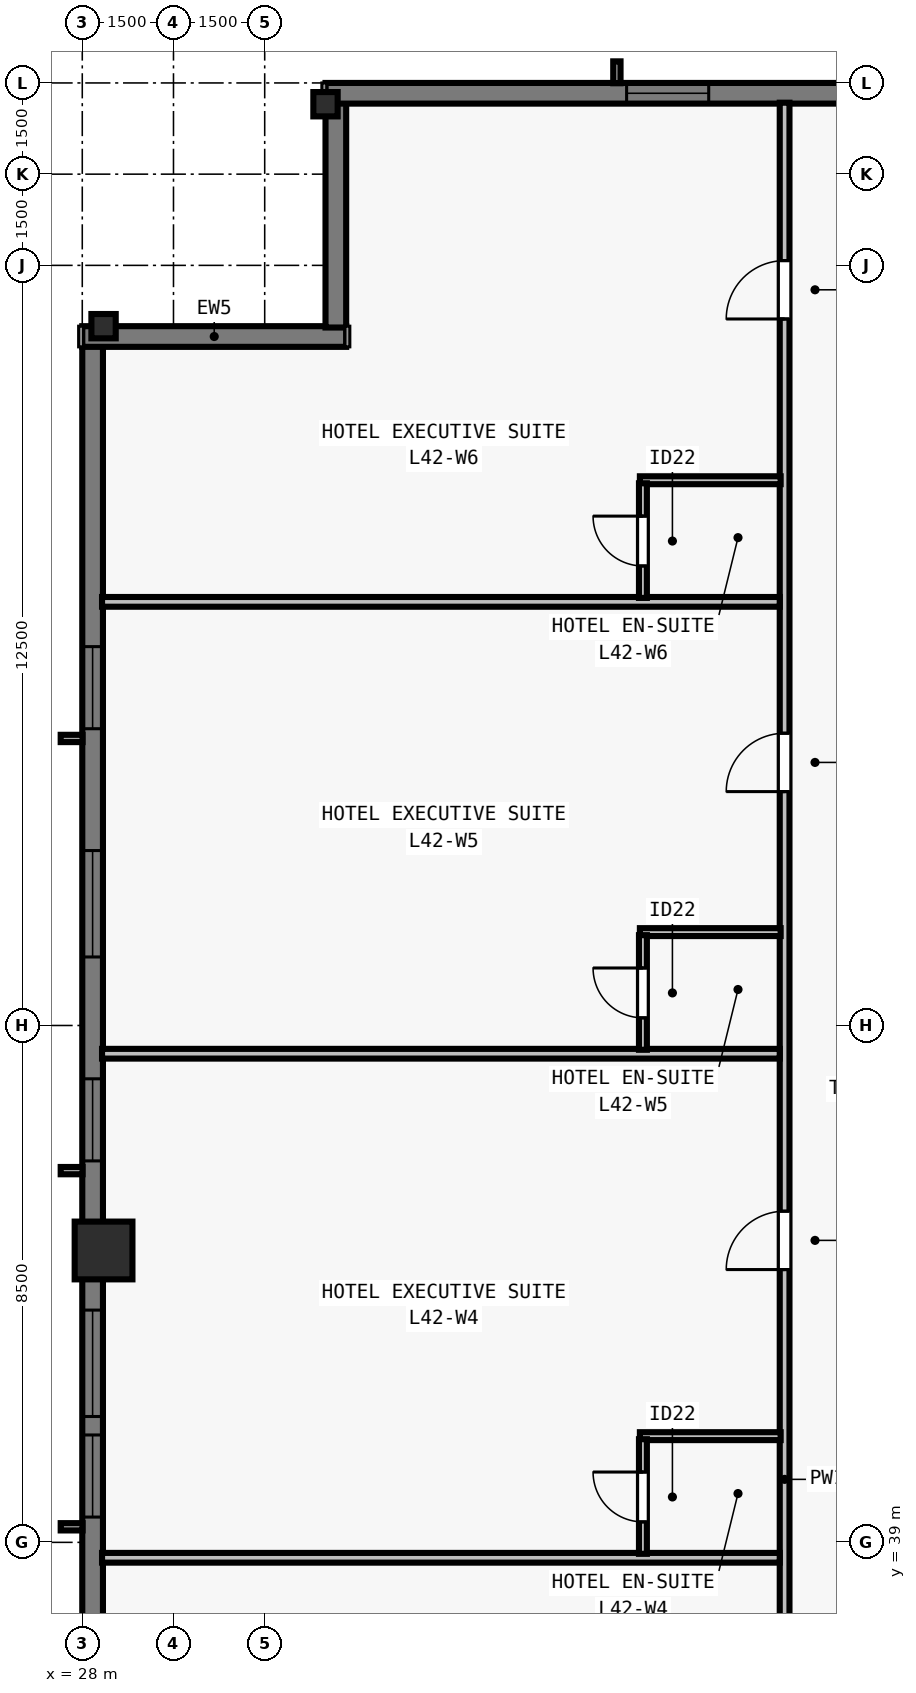
"""IFC4 building model, lengths in metres.
Left out: names, types, materials, properties, quantities, classifications, styles, units other than length and angle.
Written with IfcOpenShell. Run it as: python <this file> out.ifc"""

import sys

from ifc_helpers import new_model, si_unit, direction, frame, frame_2d, origin, origin_2d, place, context, subcontext, project, spatial, rectangle, i_section, extrude, element, fill, save


model = new_model("IFC4")
c1 = context("Model", 3, precision=1e-05, world=origin(), true_north=direction((0.0, 1.0)))
c2 = subcontext(c1, "Body", "Model", "MODEL_VIEW")
j1 = project(units=[si_unit("LENGTHUNIT", "METRE"), si_unit("PLANEANGLEUNIT", "RADIAN")], contexts=[c1])
p1 = place(None, origin())
s1 = spatial("IfcSite", under=j1, at=p1, CompositionType="ELEMENT")
p2 = place(p1, origin())
s2 = spatial("IfcBuilding", under=s1, at=p2, CompositionType="ELEMENT")
p3 = place(p2, frame((0.0, 0.0, 155.0)))
s3 = spatial("IfcBuildingStorey", under=s2, at=p3, CompositionType="ELEMENT", Elevation=155.0)
for number, where, z_axis, x_axis in (
    (1, (32.0, 62.65, 0.0), (0.0, 0.0, 1.0), (1.0, 0.0, 0.0)),
    (2, (28.35, 59.0, 0.0), (0.0, 0.0, 1.0), (0.0, 1.0, 0.0)),
):
    element("IfcColumn", number, at=place(p3, frame(where, z_axis=z_axis, x_axis=x_axis)), inside=s3, PredefinedType="COLUMN", context=c2, shape_type="SweptSolid", body=[
        extrude(i_section(OverallWidth=0.4, OverallDepth=0.4, WebThickness=0.022, FlangeThickness=0.036, at=origin_2d()), origin(), (0.0, 0.0, 1.0), 3.5),
    ])
p4 = place(p3, frame((28.35, 43.8, 0.0), z_axis=(0.0, 0.0, 1.0), x_axis=(0.0, 1.0, 0.0)))
e3 = element("IfcColumn", 3, at=p4, inside=s3, PredefinedType="COLUMN", context=c2, shape_type="SweptSolid", body=[
    extrude(rectangle(XDim=0.95, YDim=0.95, at=origin_2d()), origin(), (0.0, 0.0, 1.0), 3.5),
])
p5 = place(p3, frame((28.17, 19.0, 0.0), z_axis=(0.0, 0.0, 1.0), x_axis=(0.0, 1.0, 0.0)))
e4 = element("IfcWall", 4, at=p5, inside=s3, PredefinedType="SOLIDWALL", context=c2, shape_type="SweptSolid", body=[
    extrude(rectangle(XDim=39.682, YDim=0.34, at=frame_2d((19.841, 0.0))), origin(), (0.0, 0.0, 1.0), 3.28),
])
p6 = place(p5, frame((4.952, 0.0, 0.8)))
e5 = element("IfcOpeningElement", 5, at=p6, cuts=e4, PredefinedType="OPENING", context=c2, shape_type="SweptSolid", body=[
    extrude(rectangle(XDim=1.35, YDim=1.66, at=frame_2d((0.675, 0.83))), frame((0.0, 0.18, 0.0), z_axis=(0.0, -1.0, 0.0), x_axis=(1.0, 0.0, 0.0)), (0.0, 0.0, 1.0), 0.36),
])
p7 = place(p5, frame((8.305, 0.0, 0.8)))
e6 = element("IfcOpeningElement", 6, at=p7, cuts=e4, PredefinedType="OPENING", context=c2, shape_type="SweptSolid", body=[
    extrude(rectangle(XDim=1.75, YDim=1.66, at=frame_2d((0.875, 0.83))), frame((0.0, 0.18, 0.0), z_axis=(0.0, -1.0, 0.0), x_axis=(1.0, 0.0, 0.0)), (0.0, 0.0, 1.0), 0.36),
])
p8 = place(p5, frame((12.909, 0.0, 0.8)))
e7 = element("IfcOpeningElement", 7, at=p8, cuts=e4, PredefinedType="OPENING", context=c2, shape_type="SweptSolid", body=[
    extrude(rectangle(XDim=1.35, YDim=1.66, at=frame_2d((0.675, 0.83))), frame((0.0, 0.18, 0.0), z_axis=(0.0, -1.0, 0.0), x_axis=(1.0, 0.0, 0.0)), (0.0, 0.0, 1.0), 0.36),
])
p9 = place(p5, frame((16.262, 0.0, 0.8)))
e8 = element("IfcOpeningElement", 8, at=p9, cuts=e4, PredefinedType="OPENING", context=c2, shape_type="SweptSolid", body=[
    extrude(rectangle(XDim=1.75, YDim=1.66, at=frame_2d((0.875, 0.83))), frame((0.0, 0.18, 0.0), z_axis=(0.0, -1.0, 0.0), x_axis=(1.0, 0.0, 0.0)), (0.0, 0.0, 1.0), 0.36),
])
p10 = place(p5, frame((20.416, 0.0, 0.8)))
e9 = element("IfcOpeningElement", 9, at=p10, cuts=e4, PredefinedType="OPENING", context=c2, shape_type="SweptSolid", body=[
    extrude(rectangle(XDim=1.35, YDim=1.66, at=frame_2d((0.675, 0.83))), frame((0.0, 0.18, 0.0), z_axis=(0.0, -1.0, 0.0), x_axis=(1.0, 0.0, 0.0)), (0.0, 0.0, 1.0), 0.36),
])
p11 = place(p5, frame((22.07, 0.0, 0.8)))
e10 = element("IfcOpeningElement", 10, at=p11, cuts=e4, PredefinedType="OPENING", context=c2, shape_type="SweptSolid", body=[
    extrude(rectangle(XDim=1.75, YDim=1.66, at=frame_2d((0.875, 0.83))), frame((0.0, 0.18, 0.0), z_axis=(0.0, -1.0, 0.0), x_axis=(1.0, 0.0, 0.0)), (0.0, 0.0, 1.0), 0.36),
])
p12 = place(p5, frame((26.273, 0.0, 0.8)))
e11 = element("IfcOpeningElement", 11, at=p12, cuts=e4, PredefinedType="OPENING", context=c2, shape_type="SweptSolid", body=[
    extrude(rectangle(XDim=1.35, YDim=1.66, at=frame_2d((0.675, 0.83))), frame((0.0, 0.18, 0.0), z_axis=(0.0, -1.0, 0.0), x_axis=(1.0, 0.0, 0.0)), (0.0, 0.0, 1.0), 0.36),
])
p13 = place(p5, frame((29.627, 0.0, 0.8)))
e12 = element("IfcOpeningElement", 12, at=p13, cuts=e4, PredefinedType="OPENING", context=c2, shape_type="SweptSolid", body=[
    extrude(rectangle(XDim=1.75, YDim=1.66, at=frame_2d((0.875, 0.83))), frame((0.0, 0.18, 0.0), z_axis=(0.0, -1.0, 0.0), x_axis=(1.0, 0.0, 0.0)), (0.0, 0.0, 1.0), 0.36),
])
p14 = place(p5, frame((33.38, 0.0, 0.8)))
e13 = element("IfcOpeningElement", 13, at=p14, cuts=e4, PredefinedType="OPENING", context=c2, shape_type="SweptSolid", body=[
    extrude(rectangle(XDim=1.35, YDim=1.66, at=frame_2d((0.675, 0.83))), frame((0.0, 0.18, 0.0), z_axis=(0.0, -1.0, 0.0), x_axis=(1.0, 0.0, 0.0)), (0.0, 0.0, 1.0), 0.36),
])
p15 = place(p3, frame((28.0, 58.83, 0.0), z_axis=(0.0, 0.0, 1.0), x_axis=(1.0, 0.0, 0.0)))
e14 = element("IfcWall", 14, at=p15, inside=s3, PredefinedType="SOLIDWALL", context=c2, shape_type="SweptSolid", body=[
    extrude(rectangle(XDim=4.34, YDim=0.34, at=frame_2d((2.17, 0.0))), origin(), (0.0, 0.0, 1.0), 3.28),
])
p16 = place(p3, frame((32.17, 58.978, 0.0), z_axis=(0.0, 0.0, 1.0), x_axis=(0.0, 1.0, 0.0)))
e15 = element("IfcWall", 15, at=p16, inside=s3, PredefinedType="SOLIDWALL", context=c2, shape_type="SweptSolid", body=[
    extrude(rectangle(XDim=3.704, YDim=0.34, at=frame_2d((1.852, 0.0))), origin(), (0.0, 0.0, 1.0), 3.28),
])
p17 = place(p3, frame((32.0, 62.83, 0.0), z_axis=(0.0, 0.0, 1.0), x_axis=(1.0, 0.0, 0.0)))
e16 = element("IfcWall", 16, at=p17, inside=s3, PredefinedType="SOLIDWALL", context=c2, shape_type="SweptSolid", body=[
    extrude(rectangle(XDim=39.682, YDim=0.34, at=frame_2d((19.841, 0.0))), origin(), (0.0, 0.0, 1.0), 3.28),
])
p18 = place(p17, frame((4.952, 0.0, 0.8)))
e17 = element("IfcOpeningElement", 17, at=p18, cuts=e16, PredefinedType="OPENING", context=c2, shape_type="SweptSolid", body=[
    extrude(rectangle(XDim=1.35, YDim=1.66, at=frame_2d((0.675, 0.83))), frame((0.0, 0.18, 0.0), z_axis=(0.0, -1.0, 0.0), x_axis=(1.0, 0.0, 0.0)), (0.0, 0.0, 1.0), 0.36),
])
p19 = place(p17, frame((12.059, 0.0, 0.8)))
e18 = element("IfcOpeningElement", 18, at=p19, cuts=e16, PredefinedType="OPENING", context=c2, shape_type="SweptSolid", body=[
    extrude(rectangle(XDim=1.35, YDim=1.66, at=frame_2d((0.675, 0.83))), frame((0.0, 0.18, 0.0), z_axis=(0.0, -1.0, 0.0), x_axis=(1.0, 0.0, 0.0)), (0.0, 0.0, 1.0), 0.36),
])
p20 = place(p17, frame((16.262, 0.0, 0.8)))
e19 = element("IfcOpeningElement", 19, at=p20, cuts=e16, PredefinedType="OPENING", context=c2, shape_type="SweptSolid", body=[
    extrude(rectangle(XDim=1.75, YDim=1.66, at=frame_2d((0.875, 0.83))), frame((0.0, 0.18, 0.0), z_axis=(0.0, -1.0, 0.0), x_axis=(1.0, 0.0, 0.0)), (0.0, 0.0, 1.0), 0.36),
])
p21 = place(p17, frame((18.316, 0.0, 0.8)))
e20 = element("IfcOpeningElement", 20, at=p21, cuts=e16, PredefinedType="OPENING", context=c2, shape_type="SweptSolid", body=[
    extrude(rectangle(XDim=1.35, YDim=1.66, at=frame_2d((0.675, 0.83))), frame((0.0, 0.18, 0.0), z_axis=(0.0, -1.0, 0.0), x_axis=(1.0, 0.0, 0.0)), (0.0, 0.0, 1.0), 0.36),
])
p22 = place(p17, frame((22.07, 0.0, 0.8)))
e21 = element("IfcOpeningElement", 21, at=p22, cuts=e16, PredefinedType="OPENING", context=c2, shape_type="SweptSolid", body=[
    extrude(rectangle(XDim=1.75, YDim=1.66, at=frame_2d((0.875, 0.83))), frame((0.0, 0.18, 0.0), z_axis=(0.0, -1.0, 0.0), x_axis=(1.0, 0.0, 0.0)), (0.0, 0.0, 1.0), 0.36),
])
p23 = place(p17, frame((26.273, 0.0, 0.8)))
e22 = element("IfcOpeningElement", 22, at=p23, cuts=e16, PredefinedType="OPENING", context=c2, shape_type="SweptSolid", body=[
    extrude(rectangle(XDim=1.35, YDim=1.66, at=frame_2d((0.675, 0.83))), frame((0.0, 0.18, 0.0), z_axis=(0.0, -1.0, 0.0), x_axis=(1.0, 0.0, 0.0)), (0.0, 0.0, 1.0), 0.36),
])
p24 = place(p17, frame((29.627, 0.0, 0.8)))
e23 = element("IfcOpeningElement", 23, at=p24, cuts=e16, PredefinedType="OPENING", context=c2, shape_type="SweptSolid", body=[
    extrude(rectangle(XDim=1.75, YDim=1.66, at=frame_2d((0.875, 0.83))), frame((0.0, 0.18, 0.0), z_axis=(0.0, -1.0, 0.0), x_axis=(1.0, 0.0, 0.0)), (0.0, 0.0, 1.0), 0.36),
])
p25 = place(p3, frame((39.55, 15.325, 0.0), z_axis=(0.0, 0.0, 1.0), x_axis=(0.0, 1.0, 0.0)))
e24 = element("IfcWall", 24, at=p25, inside=s3, PredefinedType="PARTITIONING", context=c2, shape_type="SweptSolid", body=[
    extrude(rectangle(XDim=47.35, YDim=0.16, at=frame_2d((23.675, 0.0))), origin(), (0.0, 0.0, 1.0), 2.555),
])
p26 = place(p25, frame((4.718, 0.0, 0.0)))
e25 = element("IfcOpeningElement", 25, at=p26, cuts=e24, PredefinedType="OPENING", context=c2, shape_type="SweptSolid", body=[
    extrude(rectangle(XDim=0.96, YDim=2.15, at=frame_2d((0.48, 1.075))), frame((0.0, 0.09, 0.0), z_axis=(0.0, -1.0, 0.0), x_axis=(1.0, 0.0, 0.0)), (0.0, 0.0, 1.0), 0.18),
])
p27 = place(p25, frame((12.441, 0.0, 0.0)))
e26 = element("IfcOpeningElement", 26, at=p27, cuts=e24, PredefinedType="OPENING", context=c2, shape_type="SweptSolid", body=[
    extrude(rectangle(XDim=0.96, YDim=2.15, at=frame_2d((0.48, 1.075))), frame((0.0, 0.09, 0.0), z_axis=(0.0, -1.0, 0.0), x_axis=(1.0, 0.0, 0.0)), (0.0, 0.0, 1.0), 0.18),
])
p28 = place(p25, frame((20.301, 0.0, 0.0)))
e27 = element("IfcOpeningElement", 27, at=p28, cuts=e24, PredefinedType="OPENING", context=c2, shape_type="SweptSolid", body=[
    extrude(rectangle(XDim=0.96, YDim=2.15, at=frame_2d((0.48, 1.075))), frame((0.0, 0.09, 0.0), z_axis=(0.0, -1.0, 0.0), x_axis=(1.0, 0.0, 0.0)), (0.0, 0.0, 1.0), 0.18),
])
p29 = place(p25, frame((28.161, 0.0, 0.0)))
e28 = element("IfcOpeningElement", 28, at=p29, cuts=e24, PredefinedType="OPENING", context=c2, shape_type="SweptSolid", body=[
    extrude(rectangle(XDim=0.96, YDim=2.15, at=frame_2d((0.48, 1.075))), frame((0.0, 0.09, 0.0), z_axis=(0.0, -1.0, 0.0), x_axis=(1.0, 0.0, 0.0)), (0.0, 0.0, 1.0), 0.18),
])
p30 = place(p25, frame((36.021, 0.0, 0.0)))
e29 = element("IfcOpeningElement", 29, at=p30, cuts=e24, PredefinedType="OPENING", context=c2, shape_type="SweptSolid", body=[
    extrude(rectangle(XDim=0.96, YDim=2.15, at=frame_2d((0.48, 1.075))), frame((0.0, 0.09, 0.0), z_axis=(0.0, -1.0, 0.0), x_axis=(1.0, 0.0, 0.0)), (0.0, 0.0, 1.0), 0.18),
])
p31 = place(p25, frame((43.793, 0.0, 0.0)))
e30 = element("IfcOpeningElement", 30, at=p31, cuts=e24, PredefinedType="OPENING", context=c2, shape_type="SweptSolid", body=[
    extrude(rectangle(XDim=0.96, YDim=2.15, at=frame_2d((0.48, 1.075))), frame((0.0, 0.09, 0.0), z_axis=(0.0, -1.0, 0.0), x_axis=(1.0, 0.0, 0.0)), (0.0, 0.0, 1.0), 0.18),
])
p32 = place(p3, frame((28.325, 38.747, 0.0), z_axis=(0.0, 0.0, 1.0), x_axis=(1.0, 0.0, 0.0)))
e31 = element("IfcWall", 31, at=p32, inside=s3, PredefinedType="PARTITIONING", context=c2, shape_type="SweptSolid", body=[
    extrude(rectangle(XDim=11.145, YDim=0.16, at=frame_2d((5.573, 0.0))), origin(), (0.0, 0.0, 1.0), 2.896),
])
p33 = place(p3, frame((37.17, 40.747, 0.0), z_axis=(0.0, 0.0, 1.0), x_axis=(1.0, 0.0, 0.0)))
e32 = element("IfcWall", 32, at=p33, inside=s3, PredefinedType="PLUMBINGWALL", context=c2, shape_type="SweptSolid", body=[
    extrude(rectangle(XDim=2.315, YDim=0.13, at=frame_2d((1.158, 0.0))), origin(), (0.0, 0.0, 1.0), 3.28),
])
p34 = place(p3, frame((37.22, 38.812, 0.0), z_axis=(0.0, 0.0, 1.0), x_axis=(0.0, 1.0, 0.0)))
e33 = element("IfcWall", 33, at=p34, inside=s3, PredefinedType="PLUMBINGWALL", context=c2, shape_type="SweptSolid", body=[
    extrude(rectangle(XDim=1.885, YDim=0.13, at=frame_2d((0.942, 0.0))), origin(), (0.0, 0.0, 1.0), 3.28),
])
p35 = place(p34, frame((0.525, 0.0, 0.0)))
e34 = element("IfcOpeningElement", 34, at=p35, cuts=e33, PredefinedType="OPENING", context=c2, shape_type="SweptSolid", body=[
    extrude(rectangle(XDim=0.82, YDim=2.1, at=frame_2d((0.41, 1.05))), frame((0.0, 0.075, 0.0), z_axis=(0.0, -1.0, 0.0), x_axis=(1.0, 0.0, 0.0)), (0.0, 0.0, 1.0), 0.15),
])
p36 = place(p3, frame((28.325, 47.035, 0.0), z_axis=(0.0, 0.0, 1.0), x_axis=(1.0, 0.0, 0.0)))
e35 = element("IfcWall", 35, at=p36, inside=s3, PredefinedType="PARTITIONING", context=c2, shape_type="SweptSolid", body=[
    extrude(rectangle(XDim=11.145, YDim=0.16, at=frame_2d((5.573, 0.0))), origin(), (0.0, 0.0, 1.0), 3.28),
])
p37 = place(p3, frame((37.17, 49.035, 0.0), z_axis=(0.0, 0.0, 1.0), x_axis=(1.0, 0.0, 0.0)))
e36 = element("IfcWall", 36, at=p37, inside=s3, PredefinedType="PLUMBINGWALL", context=c2, shape_type="SweptSolid", body=[
    extrude(rectangle(XDim=2.315, YDim=0.13, at=frame_2d((1.158, 0.0))), origin(), (0.0, 0.0, 1.0), 3.28),
])
p38 = place(p3, frame((37.22, 47.101, 0.0), z_axis=(0.0, 0.0, 1.0), x_axis=(0.0, 1.0, 0.0)))
e37 = element("IfcWall", 37, at=p38, inside=s3, PredefinedType="PLUMBINGWALL", context=c2, shape_type="SweptSolid", body=[
    extrude(rectangle(XDim=1.885, YDim=0.13, at=frame_2d((0.942, 0.0))), origin(), (0.0, 0.0, 1.0), 3.28),
])
p39 = place(p38, frame((0.525, 0.0, 0.0)))
e38 = element("IfcOpeningElement", 38, at=p39, cuts=e37, PredefinedType="OPENING", context=c2, shape_type="SweptSolid", body=[
    extrude(rectangle(XDim=0.82, YDim=2.1, at=frame_2d((0.41, 1.05))), frame((0.0, 0.075, 0.0), z_axis=(0.0, -1.0, 0.0), x_axis=(1.0, 0.0, 0.0)), (0.0, 0.0, 1.0), 0.15),
])
p40 = place(p3, frame((28.325, 54.467, 0.0), z_axis=(0.0, 0.0, 1.0), x_axis=(1.0, 0.0, 0.0)))
e39 = element("IfcWall", 39, at=p40, inside=s3, PredefinedType="PARTITIONING", context=c2, shape_type="SweptSolid", body=[
    extrude(rectangle(XDim=11.145, YDim=0.16, at=frame_2d((5.573, 0.0))), origin(), (0.0, 0.0, 1.0), 2.896),
])
p41 = place(p3, frame((37.17, 56.467, 0.0), z_axis=(0.0, 0.0, 1.0), x_axis=(1.0, 0.0, 0.0)))
e40 = element("IfcWall", 40, at=p41, inside=s3, PredefinedType="PLUMBINGWALL", context=c2, shape_type="SweptSolid", body=[
    extrude(rectangle(XDim=2.315, YDim=0.13, at=frame_2d((1.158, 0.0))), origin(), (0.0, 0.0, 1.0), 3.28),
])
p42 = place(p3, frame((37.22, 54.531, 0.0), z_axis=(0.0, 0.0, 1.0), x_axis=(0.0, 1.0, 0.0)))
e41 = element("IfcWall", 41, at=p42, inside=s3, PredefinedType="PLUMBINGWALL", context=c2, shape_type="SweptSolid", body=[
    extrude(rectangle(XDim=1.885, YDim=0.13, at=frame_2d((0.942, 0.0))), origin(), (0.0, 0.0, 1.0), 2.555),
])
p43 = place(p42, frame((0.525, 0.0, 0.0)))
e42 = element("IfcOpeningElement", 42, at=p43, cuts=e41, PredefinedType="OPENING", context=c2, shape_type="SweptSolid", body=[
    extrude(rectangle(XDim=0.82, YDim=2.1, at=frame_2d((0.41, 1.05))), frame((0.0, 0.075, 0.0), z_axis=(0.0, -1.0, 0.0), x_axis=(1.0, 0.0, 0.0)), (0.0, 0.0, 1.0), 0.15),
])
p44 = place(p10, origin())
e43 = element("IfcWindow", 43, at=p44, inside=s3, PartitioningType="SINGLE_PANEL", PredefinedType="WINDOW", context=c2, shape_type="SweptSolid", body=[
    extrude(rectangle(XDim=1.35, YDim=1.66, at=frame_2d((0.675, 0.83))), frame((0.0, -0.05, 0.0), z_axis=(0.0, -1.0, 0.0), x_axis=(1.0, 0.0, 0.0)), (0.0, 0.0, 1.0), 0.06),
])
fill(e9, e43)
p45 = place(p11, origin())
e44 = element("IfcWindow", 44, at=p45, inside=s3, PartitioningType="SINGLE_PANEL", PredefinedType="WINDOW", context=c2, shape_type="SweptSolid", body=[
    extrude(rectangle(XDim=1.75, YDim=1.66, at=frame_2d((0.875, 0.83))), frame((0.0, -0.05, 0.0), z_axis=(0.0, -1.0, 0.0), x_axis=(1.0, 0.0, 0.0)), (0.0, 0.0, 1.0), 0.06),
])
fill(e10, e44)
p46 = place(p12, origin())
e45 = element("IfcWindow", 45, at=p46, inside=s3, PartitioningType="SINGLE_PANEL", PredefinedType="WINDOW", context=c2, shape_type="SweptSolid", body=[
    extrude(rectangle(XDim=1.35, YDim=1.66, at=frame_2d((0.675, 0.83))), frame((0.0, -0.05, 0.0), z_axis=(0.0, -1.0, 0.0), x_axis=(1.0, 0.0, 0.0)), (0.0, 0.0, 1.0), 0.06),
])
fill(e11, e45)
p47 = place(p13, origin())
e46 = element("IfcWindow", 46, at=p47, inside=s3, PartitioningType="SINGLE_PANEL", PredefinedType="WINDOW", context=c2, shape_type="SweptSolid", body=[
    extrude(rectangle(XDim=1.75, YDim=1.66, at=frame_2d((0.875, 0.83))), frame((0.0, -0.05, 0.0), z_axis=(0.0, -1.0, 0.0), x_axis=(1.0, 0.0, 0.0)), (0.0, 0.0, 1.0), 0.06),
])
fill(e12, e46)
p48 = place(p14, origin())
e47 = element("IfcWindow", 47, at=p48, inside=s3, PartitioningType="SINGLE_PANEL", PredefinedType="WINDOW", context=c2, shape_type="SweptSolid", body=[
    extrude(rectangle(XDim=1.35, YDim=1.66, at=frame_2d((0.675, 0.83))), frame((0.0, -0.05, 0.0), z_axis=(0.0, -1.0, 0.0), x_axis=(1.0, 0.0, 0.0)), (0.0, 0.0, 1.0), 0.06),
])
fill(e13, e47)
p49 = place(p18, origin())
e48 = element("IfcWindow", 48, at=p49, inside=s3, PartitioningType="SINGLE_PANEL", PredefinedType="WINDOW", context=c2, shape_type="SweptSolid", body=[
    extrude(rectangle(XDim=1.35, YDim=1.66, at=frame_2d((0.675, 0.83))), frame((0.0, -0.05, 0.0), z_axis=(0.0, -1.0, 0.0), x_axis=(1.0, 0.0, 0.0)), (0.0, 0.0, 1.0), 0.06),
])
fill(e17, e48)
p50 = place(p35, origin())
e49 = element("IfcDoor", 49, at=p50, inside=s3, OperationType="SINGLE_SWING_RIGHT", PredefinedType="DOOR", context=c2, shape_type="SweptSolid", body=[
    extrude(rectangle(XDim=0.82, YDim=2.1, at=frame_2d((0.41, 1.05))), frame((0.0, 0.025, 0.0), z_axis=(0.0, -1.0, 0.0), x_axis=(1.0, 0.0, 0.0)), (0.0, 0.0, 1.0), 0.05),
])
fill(e34, e49)
p51 = place(p29, origin())
e50 = element("IfcDoor", 50, at=p51, inside=s3, OperationType="SINGLE_SWING_LEFT", PredefinedType="DOOR", context=c2, shape_type="SweptSolid", body=[
    extrude(rectangle(XDim=0.96, YDim=2.15, at=frame_2d((0.48, 1.075))), frame((0.0, 0.025, 0.0), z_axis=(0.0, -1.0, 0.0), x_axis=(1.0, 0.0, 0.0)), (0.0, 0.0, 1.0), 0.05),
])
fill(e28, e50)
p52 = place(p39, origin())
e51 = element("IfcDoor", 51, at=p52, inside=s3, OperationType="SINGLE_SWING_RIGHT", PredefinedType="DOOR", context=c2, shape_type="SweptSolid", body=[
    extrude(rectangle(XDim=0.82, YDim=2.1, at=frame_2d((0.41, 1.05))), frame((0.0, 0.025, 0.0), z_axis=(0.0, -1.0, 0.0), x_axis=(1.0, 0.0, 0.0)), (0.0, 0.0, 1.0), 0.05),
])
fill(e38, e51)
p53 = place(p30, origin())
e52 = element("IfcDoor", 52, at=p53, inside=s3, OperationType="SINGLE_SWING_LEFT", PredefinedType="DOOR", context=c2, shape_type="SweptSolid", body=[
    extrude(rectangle(XDim=0.96, YDim=2.15, at=frame_2d((0.48, 1.075))), frame((0.0, 0.025, 0.0), z_axis=(0.0, -1.0, 0.0), x_axis=(1.0, 0.0, 0.0)), (0.0, 0.0, 1.0), 0.05),
])
fill(e29, e52)
p54 = place(p43, origin())
e53 = element("IfcDoor", 53, at=p54, inside=s3, OperationType="SINGLE_SWING_RIGHT", PredefinedType="DOOR", context=c2, shape_type="SweptSolid", body=[
    extrude(rectangle(XDim=0.82, YDim=2.1, at=frame_2d((0.41, 1.05))), frame((0.0, 0.025, 0.0), z_axis=(0.0, -1.0, 0.0), x_axis=(1.0, 0.0, 0.0)), (0.0, 0.0, 1.0), 0.05),
])
fill(e42, e53)
p55 = place(p31, origin())
e54 = element("IfcDoor", 54, at=p55, inside=s3, OperationType="SINGLE_SWING_LEFT", PredefinedType="DOOR", context=c2, shape_type="SweptSolid", body=[
    extrude(rectangle(XDim=0.96, YDim=2.15, at=frame_2d((0.48, 1.075))), frame((0.0, 0.025, 0.0), z_axis=(0.0, -1.0, 0.0), x_axis=(1.0, 0.0, 0.0)), (0.0, 0.0, 1.0), 0.05),
])
fill(e30, e54)
save(model, sys.argv[1])
